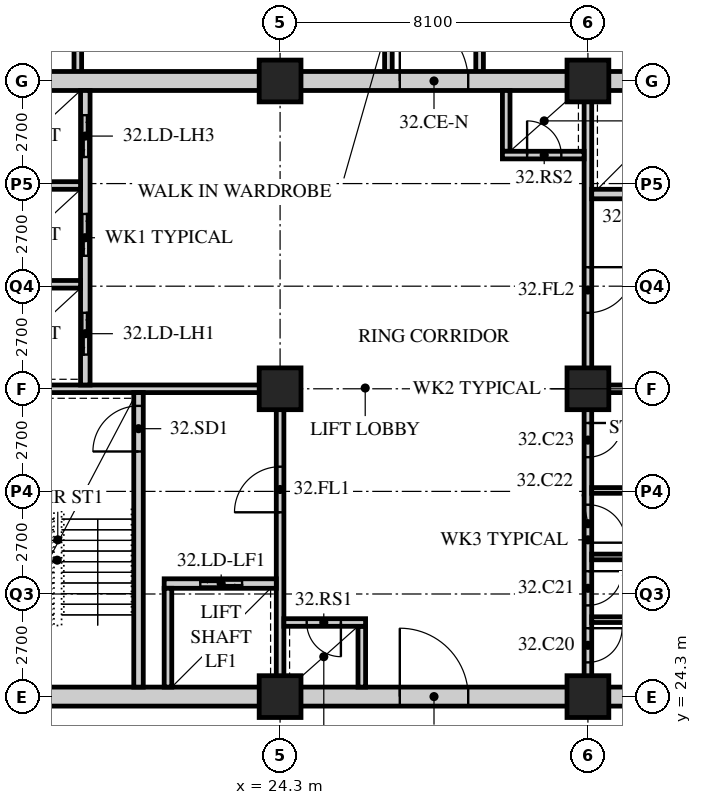
"""IFC4 building model, lengths in metres.
Left out: names, types, materials, properties, quantities, classifications, styles, units other than length and angle.
Written with IfcOpenShell. Run it as: python <this file> out.ifc"""

import sys

from ifc_helpers import new_model, si_unit, direction, frame, frame_2d, origin, origin_2d, place, context, subcontext, project, spatial, rectangle, hollow_rectangle, extrude, element, fill, save


model = new_model("IFC4")
c1 = context("Model", 3, precision=1e-05, world=origin(), true_north=direction((0.0, 1.0)))
c2 = subcontext(c1, "Body", "Model", "MODEL_VIEW")
j1 = project(units=[si_unit("LENGTHUNIT", "METRE"), si_unit("PLANEANGLEUNIT", "RADIAN")], contexts=[c1])
p1 = place(None, origin())
s1 = spatial("IfcSite", under=j1, at=p1, CompositionType="ELEMENT")
p2 = place(p1, origin())
s2 = spatial("IfcBuilding", under=s1, at=p2, CompositionType="ELEMENT")
p3 = place(p2, frame((0.0, 0.0, 127.2)))
s3 = spatial("IfcBuildingStorey", under=s2, at=p3, CompositionType="ELEMENT", Elevation=127.2)
for number, where, z_axis, x_axis in (
    (1, (24.3, 24.3, 0.0), (0.0, 0.0, 1.0), (1.0, 0.0, 0.0)),
    (2, (24.3, 32.4, 0.0), (0.0, 0.0, 1.0), (1.0, 0.0, 0.0)),
    (3, (24.3, 40.5, 0.0), (0.0, 0.0, 1.0), (1.0, 0.0, 0.0)),
    (4, (32.4, 24.3, 0.0), (0.0, 0.0, 1.0), (1.0, 0.0, 0.0)),
    (5, (32.4, 32.4, 0.0), (0.0, 0.0, 1.0), (1.0, 0.0, 0.0)),
    (6, (32.4, 40.5, 0.0), (0.0, 0.0, 1.0), (1.0, 0.0, 0.0)),
):
    element("IfcColumn", number, at=place(p3, frame(where, z_axis=z_axis, x_axis=x_axis)), inside=s3, PredefinedType="COLUMN", context=c2, shape_type="SweptSolid", body=[
        extrude(hollow_rectangle(XDim=1.1, YDim=1.1, WallThickness=0.1, at=origin_2d()), origin(), (0.0, 0.0, 1.0), 3.4),
    ])
for number, where, z_axis, x_axis in (
    (7, (18.978, 44.1, 0.0), (0.0, 0.0, 1.0), (0.0, -1.0, 0.0)),
    (8, (27.15, 40.5, 0.0), (0.0, 0.0, 1.0), (0.0, 1.0, 0.0)),
    (9, (29.55, 40.5, 0.0), (0.0, 0.0, 1.0), (0.0, 1.0, 0.0)),
):
    element("IfcWall", number, at=place(p3, frame(where, z_axis=z_axis, x_axis=x_axis)), inside=s3, PredefinedType="SOLIDWALL", context=c2, shape_type="SweptSolid", body=[
        extrude(rectangle(XDim=3.6, YDim=0.2, at=frame_2d((1.8, 0.0))), origin(), (0.0, 0.0, 1.0), 3.19),
    ])
p4 = place(p3, frame((15.95, 24.3, 0.0), z_axis=(0.0, 0.0, 1.0), x_axis=(1.0, 0.0, 0.0)))
e10 = element("IfcWall", 10, at=p4, inside=s3, PredefinedType="SOLIDWALL", context=c2, shape_type="SweptSolid", body=[
    extrude(rectangle(XDim=24.8, YDim=0.5, at=frame_2d((12.4, 0.0))), origin(), (0.0, 0.0, 1.0), 2.54),
])
p5 = place(p4, frame((11.5, 0.0, 0.0)))
e11 = element("IfcOpeningElement", 11, at=p5, cuts=e10, PredefinedType="OPENING", context=c2, shape_type="SweptSolid", body=[
    extrude(rectangle(XDim=1.8, YDim=2.4, at=frame_2d((0.9, 1.2))), frame((0.0, 0.26, 0.0), z_axis=(0.0, -1.0, 0.0), x_axis=(1.0, 0.0, 0.0)), (0.0, 0.0, 1.0), 0.52),
])
p6 = place(p3, frame((15.95, 40.5, 0.0), z_axis=(0.0, 0.0, 1.0), x_axis=(1.0, 0.0, 0.0)))
e12 = element("IfcWall", 12, at=p6, inside=s3, PredefinedType="SOLIDWALL", context=c2, shape_type="SweptSolid", body=[
    extrude(rectangle(XDim=24.8, YDim=0.5, at=frame_2d((12.4, 0.0))), origin(), (0.0, 0.0, 1.0), 2.54),
])
p7 = place(p6, frame((11.5, 0.0, 0.0)))
e13 = element("IfcOpeningElement", 13, at=p7, cuts=e12, PredefinedType="OPENING", context=c2, shape_type="SweptSolid", body=[
    extrude(rectangle(XDim=1.8, YDim=2.4, at=frame_2d((0.9, 1.2))), frame((0.0, 0.26, 0.0), z_axis=(0.0, -1.0, 0.0), x_axis=(1.0, 0.0, 0.0)), (0.0, 0.0, 1.0), 0.52),
])
p8 = place(p3, frame((16.45, 32.4, 0.0), z_axis=(0.0, 0.0, 1.0), x_axis=(1.0, 0.0, 0.0)))
e14 = element("IfcWall", 14, at=p8, inside=s3, PredefinedType="SOLIDWALL", context=c2, shape_type="SweptSolid", body=[
    extrude(rectangle(XDim=7.95, YDim=0.2, at=frame_2d((3.975, 0.0))), origin(), (0.0, 0.0, 1.0), 2.578),
])
p9 = place(p3, frame((24.3, 24.55, 0.0), z_axis=(0.0, 0.0, 1.0), x_axis=(0.0, 1.0, 0.0)))
e15 = element("IfcWall", 15, at=p9, inside=s3, PredefinedType="SOLIDWALL", context=c2, shape_type="SweptSolid", body=[
    extrude(rectangle(XDim=7.75, YDim=0.2, at=frame_2d((3.875, 0.0))), origin(), (0.0, 0.0, 1.0), 2.578),
])
p10 = place(p9, frame((4.6, 0.0, 0.0)))
e16 = element("IfcOpeningElement", 16, at=p10, cuts=e15, PredefinedType="OPENING", context=c2, shape_type="SweptSolid", body=[
    extrude(rectangle(XDim=1.2, YDim=2.1, at=frame_2d((0.6, 1.05))), frame((0.0, 0.11, 0.0), z_axis=(0.0, -1.0, 0.0), x_axis=(1.0, 0.0, 0.0)), (0.0, 0.0, 1.0), 0.22),
])
p11 = place(p3, frame((20.575, 24.55, 0.0), z_axis=(0.0, 0.0, 1.0), x_axis=(0.0, 1.0, 0.0)))
e17 = element("IfcWall", 17, at=p11, inside=s3, PredefinedType="SOLIDWALL", context=c2, shape_type="SweptSolid", body=[
    extrude(rectangle(XDim=7.75, YDim=0.25, at=frame_2d((3.875, 0.0))), origin(), (0.0, 0.0, 1.0), 3.19),
])
p12 = place(p11, frame((6.2, 0.0, 0.0)))
e18 = element("IfcOpeningElement", 18, at=p12, cuts=e17, PredefinedType="OPENING", context=c2, shape_type="SweptSolid", body=[
    extrude(rectangle(XDim=1.2, YDim=2.1, at=frame_2d((0.6, 1.05))), frame((0.0, 0.135, 0.0), z_axis=(0.0, -1.0, 0.0), x_axis=(1.0, 0.0, 0.0)), (0.0, 0.0, 1.0), 0.27),
])
p13 = place(p3, frame((21.25, 27.275, 0.0), z_axis=(0.0, 0.0, 1.0), x_axis=(1.0, 0.0, 0.0)))
e19 = element("IfcWall", 19, at=p13, inside=s3, PredefinedType="SOLIDWALL", context=c2, shape_type="SweptSolid", body=[
    extrude(rectangle(XDim=2.95, YDim=0.25, at=frame_2d((1.475, 0.0))), origin(), (0.0, 0.0, 1.0), 3.19),
])
p14 = place(p13, frame((0.95, 0.0, 0.0)))
e20 = element("IfcOpeningElement", 20, at=p14, cuts=e19, PredefinedType="OPENING", context=c2, shape_type="SweptSolid", body=[
    extrude(rectangle(XDim=1.1, YDim=2.4, at=frame_2d((0.55, 1.2))), frame((0.0, 0.135, 0.0), z_axis=(0.0, -1.0, 0.0), x_axis=(1.0, 0.0, 0.0)), (0.0, 0.0, 1.0), 0.27),
])
p15 = place(p3, frame((21.35, 24.55, 0.0), z_axis=(0.0, 0.0, 1.0), x_axis=(0.0, 1.0, 0.0)))
e21 = element("IfcWall", 21, at=p15, inside=s3, PredefinedType="SOLIDWALL", context=c2, shape_type="SweptSolid", body=[
    extrude(rectangle(XDim=2.6, YDim=0.2, at=frame_2d((1.3, 0.0))), origin(), (0.0, 0.0, 1.0), 3.19),
])
p16 = place(p3, frame((19.175, 32.5, 0.0), z_axis=(0.0, 0.0, 1.0), x_axis=(0.0, 1.0, 0.0)))
e22 = element("IfcWall", 22, at=p16, inside=s3, PredefinedType="SOLIDWALL", context=c2, shape_type="SweptSolid", body=[
    extrude(rectangle(XDim=7.75, YDim=0.25, at=frame_2d((3.875, 0.0))), origin(), (0.0, 0.0, 1.0), 3.19),
])
p17 = place(p16, frame((0.8, 0.0, 0.0)))
e23 = element("IfcOpeningElement", 23, at=p17, cuts=e22, PredefinedType="OPENING", context=c2, shape_type="SweptSolid", body=[
    extrude(rectangle(XDim=1.1, YDim=2.4, at=frame_2d((0.55, 1.2))), frame((0.0, 0.135, 0.0), z_axis=(0.0, -1.0, 0.0), x_axis=(1.0, 0.0, 0.0)), (0.0, 0.0, 1.0), 0.27),
])
p18 = place(p16, frame((3.4, 0.0, 0.0)))
e24 = element("IfcOpeningElement", 24, at=p18, cuts=e22, PredefinedType="OPENING", context=c2, shape_type="SweptSolid", body=[
    extrude(rectangle(XDim=1.1, YDim=2.4, at=frame_2d((0.55, 1.2))), frame((0.0, 0.135, 0.0), z_axis=(0.0, -1.0, 0.0), x_axis=(1.0, 0.0, 0.0)), (0.0, 0.0, 1.0), 0.27),
])
p19 = place(p16, frame((6.0, 0.0, 0.0)))
e25 = element("IfcOpeningElement", 25, at=p19, cuts=e22, PredefinedType="OPENING", context=c2, shape_type="SweptSolid", body=[
    extrude(rectangle(XDim=1.1, YDim=2.4, at=frame_2d((0.55, 1.2))), frame((0.0, 0.135, 0.0), z_axis=(0.0, -1.0, 0.0), x_axis=(1.0, 0.0, 0.0)), (0.0, 0.0, 1.0), 0.27),
])
for number, where, z_axis, x_axis in (
    (26, (16.45, 35.15, 0.0), (0.0, 0.0, 1.0), (1.0, 0.0, 0.0)),
    (27, (16.45, 37.75, 0.0), (0.0, 0.0, 1.0), (1.0, 0.0, 0.0)),
):
    element("IfcWall", number, at=place(p3, frame(where, z_axis=z_axis, x_axis=x_axis)), inside=s3, PredefinedType="SOLIDWALL", context=c2, shape_type="SweptSolid", body=[
        extrude(rectangle(XDim=2.6, YDim=0.2, at=frame_2d((1.3, 0.0))), origin(), (0.0, 0.0, 1.0), 3.19),
    ])
p20 = place(p3, frame((26.45, 24.55, 0.0), z_axis=(0.0, 0.0, 1.0), x_axis=(0.0, 1.0, 0.0)))
e28 = element("IfcWall", 28, at=p20, inside=s3, PredefinedType="SOLIDWALL", context=c2, shape_type="SweptSolid", body=[
    extrude(rectangle(XDim=1.6, YDim=0.2, at=frame_2d((0.8, 0.0))), origin(), (0.0, 0.0, 1.0), 3.19),
])
p21 = place(p3, frame((24.4, 26.25, 0.0), z_axis=(0.0, 0.0, 1.0), x_axis=(1.0, 0.0, 0.0)))
e29 = element("IfcWall", 29, at=p21, inside=s3, PredefinedType="SOLIDWALL", context=c2, shape_type="SweptSolid", body=[
    extrude(rectangle(XDim=2.15, YDim=0.2, at=frame_2d((1.075, 0.0))), origin(), (0.0, 0.0, 1.0), 3.19),
])
p22 = place(p21, frame((0.6, 0.0, 0.0)))
e30 = element("IfcOpeningElement", 30, at=p22, cuts=e29, PredefinedType="OPENING", context=c2, shape_type="SweptSolid", body=[
    extrude(rectangle(XDim=0.9, YDim=2.1, at=frame_2d((0.45, 1.05))), frame((0.0, 0.11, 0.0), z_axis=(0.0, -1.0, 0.0), x_axis=(1.0, 0.0, 0.0)), (0.0, 0.0, 1.0), 0.22),
])
p23 = place(p3, frame((32.3, 32.4, 0.0), z_axis=(0.0, 0.0, 1.0), x_axis=(1.0, 0.0, 0.0)))
e31 = element("IfcWall", 31, at=p23, inside=s3, PredefinedType="SOLIDWALL", context=c2, shape_type="SweptSolid", body=[
    extrude(rectangle(XDim=7.95, YDim=0.2, at=frame_2d((3.975, 0.0))), origin(), (0.0, 0.0, 1.0), 2.578),
])
p24 = place(p3, frame((32.4, 32.5, 0.0), z_axis=(0.0, 0.0, 1.0), x_axis=(0.0, 1.0, 0.0)))
e32 = element("IfcWall", 32, at=p24, inside=s3, PredefinedType="SOLIDWALL", context=c2, shape_type="SweptSolid", body=[
    extrude(rectangle(XDim=7.75, YDim=0.2, at=frame_2d((3.875, 0.0))), origin(), (0.0, 0.0, 1.0), 2.578),
])
p25 = place(p24, frame((1.9, 0.0, 0.0)))
e33 = element("IfcOpeningElement", 33, at=p25, cuts=e32, PredefinedType="OPENING", context=c2, shape_type="SweptSolid", body=[
    extrude(rectangle(XDim=1.2, YDim=2.1, at=frame_2d((0.6, 1.05))), frame((0.0, 0.11, 0.0), z_axis=(0.0, -1.0, 0.0), x_axis=(1.0, 0.0, 0.0)), (0.0, 0.0, 1.0), 0.22),
])
p26 = place(p3, frame((32.5, 37.525, 0.0), z_axis=(0.0, 0.0, 1.0), x_axis=(1.0, 0.0, 0.0)))
e34 = element("IfcWall", 34, at=p26, inside=s3, PredefinedType="SOLIDWALL", context=c2, shape_type="SweptSolid", body=[
    extrude(rectangle(XDim=2.95, YDim=0.25, at=frame_2d((1.475, 0.0))), origin(), (0.0, 0.0, 1.0), 3.19),
])
p27 = place(p26, frame((0.9, 0.0, 0.0)))
e35 = element("IfcOpeningElement", 35, at=p27, cuts=e34, PredefinedType="OPENING", context=c2, shape_type="SweptSolid", body=[
    extrude(rectangle(XDim=1.1, YDim=2.4, at=frame_2d((0.55, 1.2))), frame((0.0, 0.135, 0.0), z_axis=(0.0, -1.0, 0.0), x_axis=(1.0, 0.0, 0.0)), (0.0, 0.0, 1.0), 0.27),
])
p28 = place(p3, frame((30.25, 38.65, 0.0), z_axis=(0.0, 0.0, 1.0), x_axis=(0.0, 1.0, 0.0)))
e36 = element("IfcWall", 36, at=p28, inside=s3, PredefinedType="SOLIDWALL", context=c2, shape_type="SweptSolid", body=[
    extrude(rectangle(XDim=1.6, YDim=0.2, at=frame_2d((0.8, 0.0))), origin(), (0.0, 0.0, 1.0), 3.19),
])
p29 = place(p3, frame((30.15, 38.55, 0.0), z_axis=(0.0, 0.0, 1.0), x_axis=(1.0, 0.0, 0.0)))
e37 = element("IfcWall", 37, at=p29, inside=s3, PredefinedType="SOLIDWALL", context=c2, shape_type="SweptSolid", body=[
    extrude(rectangle(XDim=2.15, YDim=0.2, at=frame_2d((1.075, 0.0))), origin(), (0.0, 0.0, 1.0), 3.19),
])
p30 = place(p29, frame((0.65, 0.0, 0.0)))
e38 = element("IfcOpeningElement", 38, at=p30, cuts=e37, PredefinedType="OPENING", context=c2, shape_type="SweptSolid", body=[
    extrude(rectangle(XDim=0.9, YDim=2.1, at=frame_2d((0.45, 1.05))), frame((0.0, 0.11, 0.0), z_axis=(0.0, -1.0, 0.0), x_axis=(1.0, 0.0, 0.0)), (0.0, 0.0, 1.0), 0.22),
])
p31 = place(p3, frame((32.4, 24.55, 0.0), z_axis=(0.0, 0.0, 1.0), x_axis=(0.0, 1.0, 0.0)))
e39 = element("IfcWall", 39, at=p31, inside=s3, PredefinedType="PARTITIONING", context=c2, shape_type="SweptSolid", body=[
    extrude(rectangle(XDim=7.75, YDim=0.2, at=frame_2d((3.875, 0.0))), origin(), (0.0, 0.0, 1.0), 2.578),
])
p32 = place(p31, frame((0.65, 0.0, 0.0)))
e40 = element("IfcOpeningElement", 40, at=p32, cuts=e39, PredefinedType="OPENING", context=c2, shape_type="SweptSolid", body=[
    extrude(rectangle(XDim=0.9, YDim=2.1, at=frame_2d((0.45, 1.05))), frame((0.0, 0.11, 0.0), z_axis=(0.0, -1.0, 0.0), x_axis=(1.0, 0.0, 0.0)), (0.0, 0.0, 1.0), 0.22),
])
p33 = place(p31, frame((2.15, 0.0, 0.0)))
e41 = element("IfcOpeningElement", 41, at=p33, cuts=e39, PredefinedType="OPENING", context=c2, shape_type="SweptSolid", body=[
    extrude(rectangle(XDim=0.9, YDim=2.1, at=frame_2d((0.45, 1.05))), frame((0.0, 0.11, 0.0), z_axis=(0.0, -1.0, 0.0), x_axis=(1.0, 0.0, 0.0)), (0.0, 0.0, 1.0), 0.22),
])
p34 = place(p31, frame((3.8, 0.0, 0.0)))
e42 = element("IfcOpeningElement", 42, at=p34, cuts=e39, PredefinedType="OPENING", context=c2, shape_type="SweptSolid", body=[
    extrude(rectangle(XDim=1.0, YDim=2.1, at=frame_2d((0.5, 1.05))), frame((0.0, 0.11, 0.0), z_axis=(0.0, -1.0, 0.0), x_axis=(1.0, 0.0, 0.0)), (0.0, 0.0, 1.0), 0.22),
])
p35 = place(p31, frame((6.05, 0.0, 0.0)))
e43 = element("IfcOpeningElement", 43, at=p35, cuts=e39, PredefinedType="OPENING", context=c2, shape_type="SweptSolid", body=[
    extrude(rectangle(XDim=0.9, YDim=2.1, at=frame_2d((0.45, 1.05))), frame((0.0, 0.11, 0.0), z_axis=(0.0, -1.0, 0.0), x_axis=(1.0, 0.0, 0.0)), (0.0, 0.0, 1.0), 0.22),
])
for number, where, z_axis, x_axis in (
    (44, (32.5, 26.325, 0.0), (0.0, 0.0, 1.0), (1.0, 0.0, 0.0)),
    (45, (32.5, 27.975, 0.0), (0.0, 0.0, 1.0), (1.0, 0.0, 0.0)),
):
    element("IfcWall", number, at=place(p3, frame(where, z_axis=z_axis, x_axis=x_axis)), inside=s3, PredefinedType="PARTITIONING", context=c2, shape_type="SweptSolid", body=[
        extrude(rectangle(XDim=2.55, YDim=0.15, at=frame_2d((1.275, 0.0))), origin(), (0.0, 0.0, 1.0), 3.19),
    ])
p36 = place(p3, frame((32.5, 29.725, 0.0), z_axis=(0.0, 0.0, 1.0), x_axis=(1.0, 0.0, 0.0)))
e46 = element("IfcWall", 46, at=p36, inside=s3, PredefinedType="PARTITIONING", context=c2, shape_type="SweptSolid", body=[
    extrude(rectangle(XDim=2.4, YDim=0.15, at=frame_2d((1.2, 0.0))), origin(), (0.0, 0.0, 1.0), 3.19),
])
p37 = place(p32, origin())
e47 = element("IfcDoor", 47, at=p37, inside=s3, OperationType="SINGLE_SWING_LEFT", PredefinedType="DOOR", context=c2, shape_type="SweptSolid", body=[
    extrude(rectangle(XDim=0.9, YDim=2.1, at=frame_2d((0.45, 1.05))), frame((0.0, 0.025, 0.0), z_axis=(0.0, -1.0, 0.0), x_axis=(1.0, 0.0, 0.0)), (0.0, 0.0, 1.0), 0.05),
])
fill(e40, e47)
p38 = place(p33, origin())
e48 = element("IfcDoor", 48, at=p38, inside=s3, OperationType="SINGLE_SWING_LEFT", PredefinedType="DOOR", context=c2, shape_type="SweptSolid", body=[
    extrude(rectangle(XDim=0.9, YDim=2.1, at=frame_2d((0.45, 1.05))), frame((0.0, 0.025, 0.0), z_axis=(0.0, -1.0, 0.0), x_axis=(1.0, 0.0, 0.0)), (0.0, 0.0, 1.0), 0.05),
])
fill(e41, e48)
p39 = place(p34, origin())
e49 = element("IfcDoor", 49, at=p39, inside=s3, OperationType="SINGLE_SWING_RIGHT", PredefinedType="DOOR", context=c2, shape_type="SweptSolid", body=[
    extrude(rectangle(XDim=1.0, YDim=2.1, at=frame_2d((0.5, 1.05))), frame((0.0, 0.025, 0.0), z_axis=(0.0, -1.0, 0.0), x_axis=(1.0, 0.0, 0.0)), (0.0, 0.0, 1.0), 0.05),
])
fill(e42, e49)
p40 = place(p35, origin())
e50 = element("IfcDoor", 50, at=p40, inside=s3, OperationType="SINGLE_SWING_LEFT", PredefinedType="DOOR", context=c2, shape_type="SweptSolid", body=[
    extrude(rectangle(XDim=0.9, YDim=2.1, at=frame_2d((0.45, 1.05))), frame((0.0, 0.025, 0.0), z_axis=(0.0, -1.0, 0.0), x_axis=(1.0, 0.0, 0.0)), (0.0, 0.0, 1.0), 0.05),
])
fill(e43, e50)
p41 = place(p12, origin())
e51 = element("IfcDoor", 51, at=p41, inside=s3, OperationType="SINGLE_SWING_LEFT", PredefinedType="DOOR", context=c2, shape_type="SweptSolid", body=[
    extrude(rectangle(XDim=1.2, YDim=2.1, at=frame_2d((0.6, 1.05))), frame((0.0, 0.025, 0.0), z_axis=(0.0, -1.0, 0.0), x_axis=(1.0, 0.0, 0.0)), (0.0, 0.0, 1.0), 0.05),
])
fill(e18, e51)
p42 = place(p10, origin())
e52 = element("IfcDoor", 52, at=p42, inside=s3, OperationType="SINGLE_SWING_LEFT", PredefinedType="DOOR", context=c2, shape_type="SweptSolid", body=[
    extrude(rectangle(XDim=1.2, YDim=2.1, at=frame_2d((0.6, 1.05))), frame((0.0, 0.025, 0.0), z_axis=(0.0, -1.0, 0.0), x_axis=(1.0, 0.0, 0.0)), (0.0, 0.0, 1.0), 0.05),
])
fill(e16, e52)
p43 = place(p22, origin())
e53 = element("IfcDoor", 53, at=p43, inside=s3, OperationType="SINGLE_SWING_LEFT", PredefinedType="DOOR", context=c2, shape_type="SweptSolid", body=[
    extrude(rectangle(XDim=0.9, YDim=2.1, at=frame_2d((0.45, 1.05))), frame((0.0, 0.025, 0.0), z_axis=(0.0, -1.0, 0.0), x_axis=(1.0, 0.0, 0.0)), (0.0, 0.0, 1.0), 0.05),
])
fill(e30, e53)
p44 = place(p25, origin())
e54 = element("IfcDoor", 54, at=p44, inside=s3, OperationType="SINGLE_SWING_LEFT", PredefinedType="DOOR", context=c2, shape_type="SweptSolid", body=[
    extrude(rectangle(XDim=1.2, YDim=2.1, at=frame_2d((0.6, 1.05))), frame((0.0, 0.025, 0.0), z_axis=(0.0, -1.0, 0.0), x_axis=(1.0, 0.0, 0.0)), (0.0, 0.0, 1.0), 0.05),
])
fill(e33, e54)
p45 = place(p30, origin())
e55 = element("IfcDoor", 55, at=p45, inside=s3, OperationType="SINGLE_SWING_LEFT", PredefinedType="DOOR", context=c2, shape_type="SweptSolid", body=[
    extrude(rectangle(XDim=0.9, YDim=2.1, at=frame_2d((0.45, 1.05))), frame((0.0, 0.025, 0.0), z_axis=(0.0, -1.0, 0.0), x_axis=(1.0, 0.0, 0.0)), (0.0, 0.0, 1.0), 0.05),
])
fill(e38, e55)
p46 = place(p17, origin())
e56 = element("IfcDoor", 56, at=p46, inside=s3, OperationType="DOUBLE_DOOR_SLIDING", PredefinedType="DOOR", context=c2, shape_type="SweptSolid", body=[
    extrude(rectangle(XDim=1.1, YDim=2.4, at=frame_2d((0.55, 1.2))), frame((0.0, 0.025, 0.0), z_axis=(0.0, -1.0, 0.0), x_axis=(1.0, 0.0, 0.0)), (0.0, 0.0, 1.0), 0.05),
])
fill(e23, e56)
p47 = place(p18, origin())
e57 = element("IfcDoor", 57, at=p47, inside=s3, OperationType="DOUBLE_DOOR_SLIDING", PredefinedType="DOOR", context=c2, shape_type="SweptSolid", body=[
    extrude(rectangle(XDim=1.1, YDim=2.4, at=frame_2d((0.55, 1.2))), frame((0.0, 0.025, 0.0), z_axis=(0.0, -1.0, 0.0), x_axis=(1.0, 0.0, 0.0)), (0.0, 0.0, 1.0), 0.05),
])
fill(e24, e57)
p48 = place(p19, origin())
e58 = element("IfcDoor", 58, at=p48, inside=s3, OperationType="DOUBLE_DOOR_SLIDING", PredefinedType="DOOR", context=c2, shape_type="SweptSolid", body=[
    extrude(rectangle(XDim=1.1, YDim=2.4, at=frame_2d((0.55, 1.2))), frame((0.0, 0.025, 0.0), z_axis=(0.0, -1.0, 0.0), x_axis=(1.0, 0.0, 0.0)), (0.0, 0.0, 1.0), 0.05),
])
fill(e25, e58)
p49 = place(p14, origin())
e59 = element("IfcDoor", 59, at=p49, inside=s3, OperationType="DOUBLE_DOOR_SLIDING", PredefinedType="DOOR", context=c2, shape_type="SweptSolid", body=[
    extrude(rectangle(XDim=1.1, YDim=2.4, at=frame_2d((0.55, 1.2))), frame((0.0, 0.025, 0.0), z_axis=(0.0, -1.0, 0.0), x_axis=(1.0, 0.0, 0.0)), (0.0, 0.0, 1.0), 0.05),
])
fill(e20, e59)
p50 = place(p5, origin())
e60 = element("IfcDoor", 60, at=p50, inside=s3, OperationType="DOUBLE_DOOR_SINGLE_SWING", PredefinedType="DOOR", context=c2, shape_type="SweptSolid", body=[
    extrude(rectangle(XDim=1.8, YDim=2.4, at=frame_2d((0.9, 1.2))), frame((0.0, 0.025, 0.0), z_axis=(0.0, -1.0, 0.0), x_axis=(1.0, 0.0, 0.0)), (0.0, 0.0, 1.0), 0.05),
])
fill(e11, e60)
p51 = place(p7, origin())
e61 = element("IfcDoor", 61, at=p51, inside=s3, OperationType="DOUBLE_DOOR_SINGLE_SWING", PredefinedType="DOOR", context=c2, shape_type="SweptSolid", body=[
    extrude(rectangle(XDim=1.8, YDim=2.4, at=frame_2d((0.9, 1.2))), frame((0.0, 0.025, 0.0), z_axis=(0.0, -1.0, 0.0), x_axis=(1.0, 0.0, 0.0)), (0.0, 0.0, 1.0), 0.05),
])
fill(e13, e61)
save(model, sys.argv[1])
